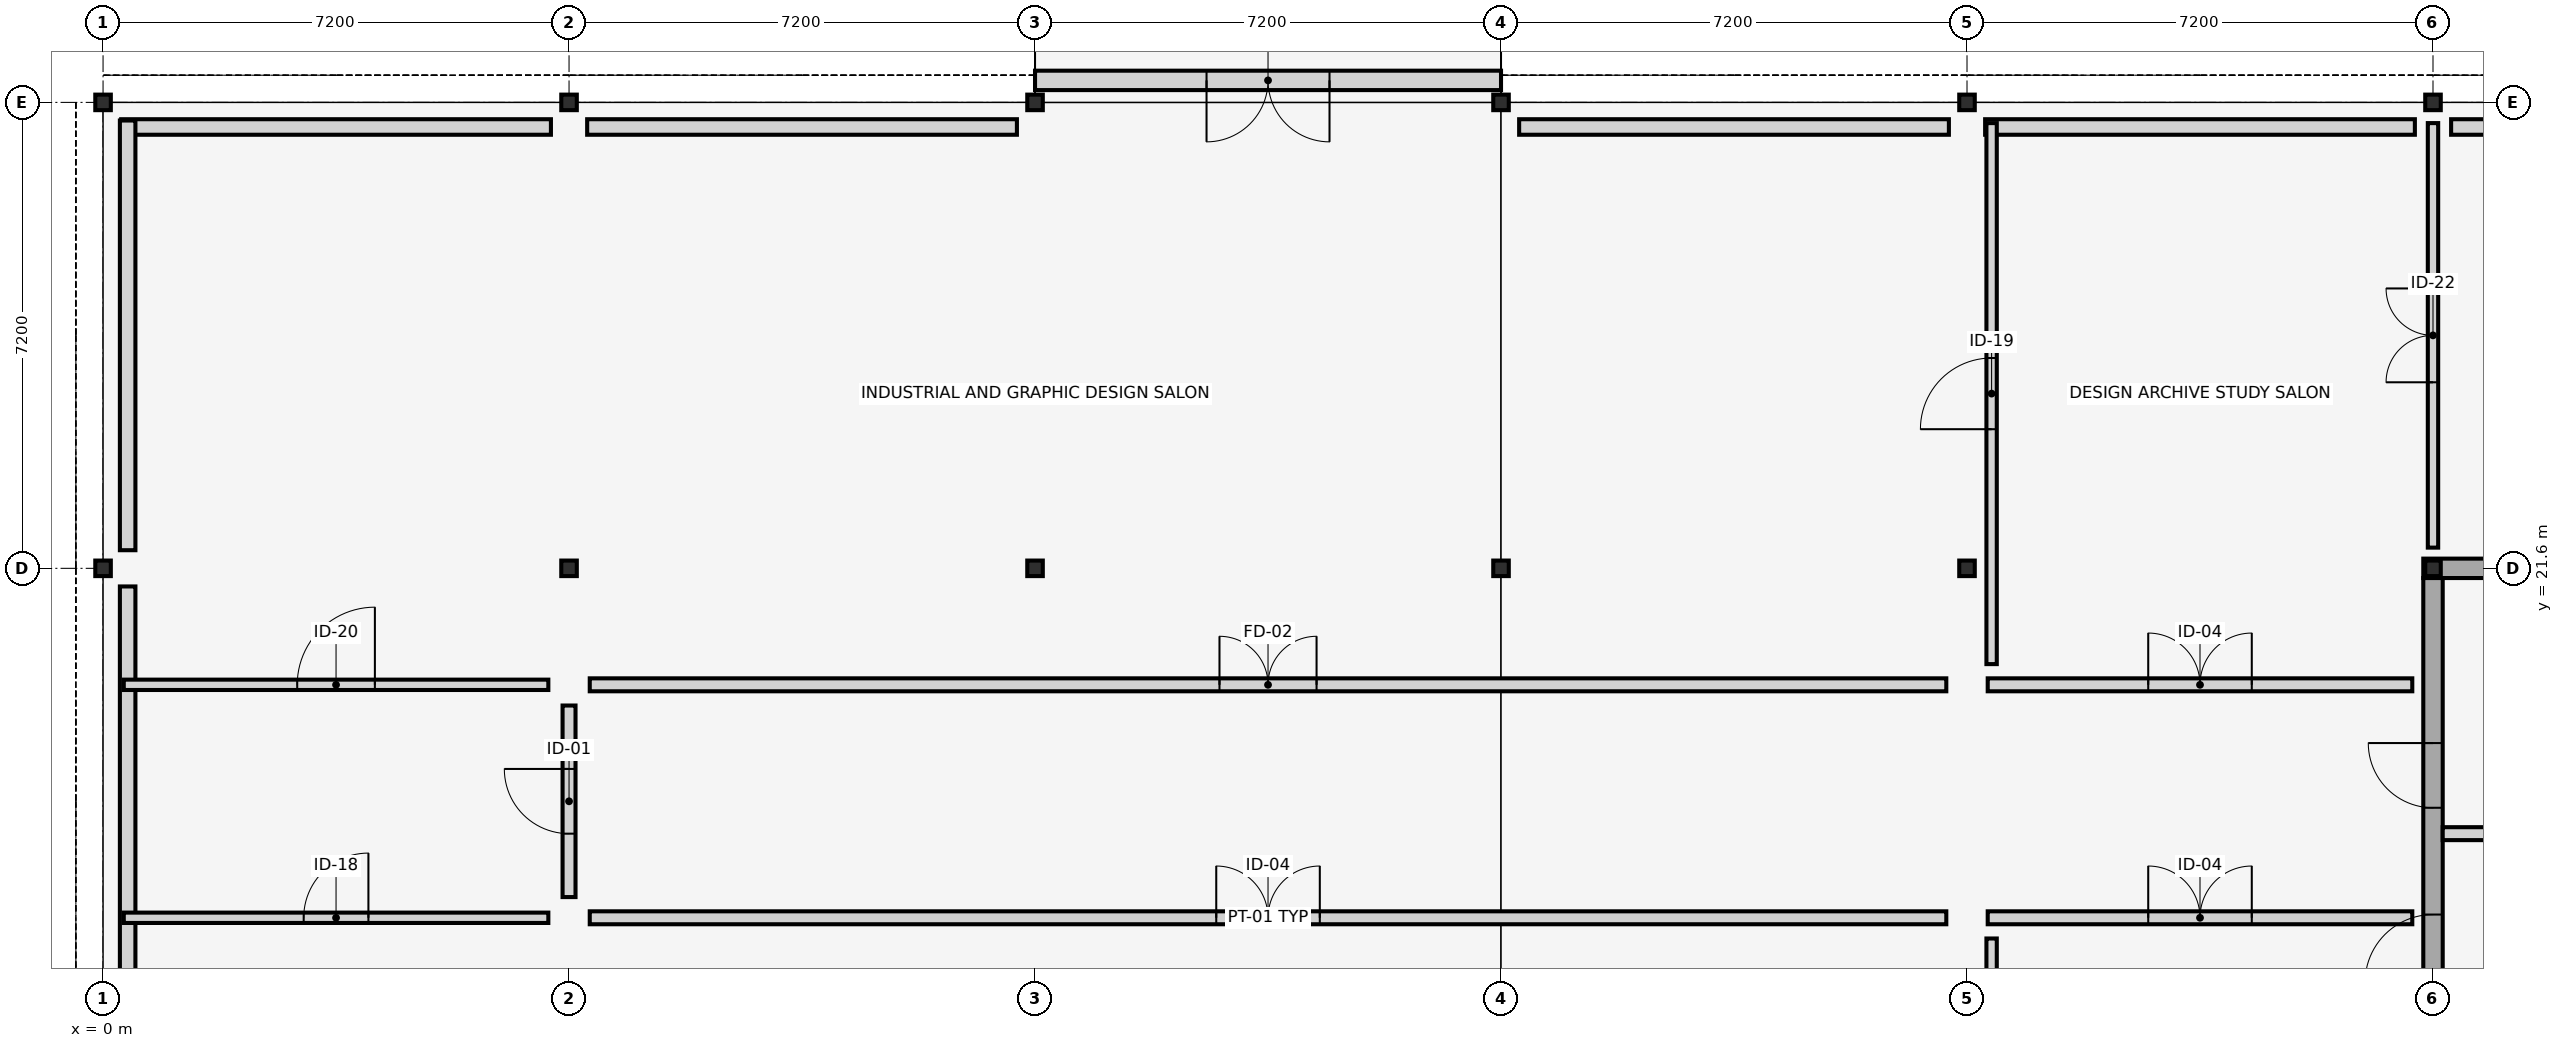
"""IFC4 building model, lengths in metres.
Left out: names, types, materials, properties, quantities, classifications, styles, units other than length and angle.
Written with IfcOpenShell. Run it as: python <this file> out.ifc"""

import sys

from ifc_helpers import new_model, si_unit, direction, frame, frame_2d, origin, origin_2d, place, context, subcontext, project, spatial, rectangle, i_section, extrude, element, fill, save


model = new_model("IFC4")
c1 = context("Model", 3, precision=1e-05, world=origin(), true_north=direction((0.0, 1.0)))
c2 = subcontext(c1, "Body", "Model", "MODEL_VIEW")
j1 = project(units=[si_unit("LENGTHUNIT", "METRE"), si_unit("PLANEANGLEUNIT", "RADIAN")], contexts=[c1])
p1 = place(None, origin())
s1 = spatial("IfcSite", under=j1, at=p1, CompositionType="ELEMENT")
p2 = place(p1, origin())
s2 = spatial("IfcBuilding", under=s1, at=p2, CompositionType="ELEMENT")
p3 = place(p2, frame((0.0, 0.0, 8.7)))
s3 = spatial("IfcBuildingStorey", under=s2, at=p3, CompositionType="ELEMENT", Elevation=8.7)
for number, where, z_axis, x_axis in (
    (1, (0.0, 21.6, 0.0), (0.0, 0.0, 1.0), (0.0, 1.0, 0.0)),
    (2, (0.0, 28.8, 0.0), (0.0, 0.0, 1.0), (1.0, 0.0, 0.0)),
    (3, (7.2, 21.6, 0.0), (0.0, 0.0, 1.0), (1.0, 0.0, 0.0)),
    (4, (7.2, 28.8, 0.0), (0.0, 0.0, 1.0), (0.0, 1.0, 0.0)),
    (5, (14.4, 21.6, 0.0), (0.0, 0.0, 1.0), (0.0, 1.0, 0.0)),
    (6, (14.4, 28.8, 0.0), (0.0, 0.0, 1.0), (1.0, 0.0, 0.0)),
    (7, (21.6, 21.6, 0.0), (0.0, 0.0, 1.0), (1.0, 0.0, 0.0)),
    (8, (21.6, 28.8, 0.0), (0.0, 0.0, 1.0), (0.0, 1.0, 0.0)),
    (9, (28.8, 21.6, 0.0), (0.0, 0.0, 1.0), (0.0, 1.0, 0.0)),
    (10, (28.8, 28.8, 0.0), (0.0, 0.0, 1.0), (1.0, 0.0, 0.0)),
    (11, (36.0, 21.6, 0.0), (0.0, 0.0, 1.0), (1.0, 0.0, 0.0)),
    (12, (36.0, 28.8, 0.0), (0.0, 0.0, 1.0), (0.0, 1.0, 0.0)),
):
    element("IfcColumn", number, at=place(p3, frame(where, z_axis=z_axis, x_axis=x_axis)), inside=s3, PredefinedType="COLUMN", context=c2, shape_type="SweptSolid", body=[
        extrude(i_section(OverallWidth=0.24, OverallDepth=0.24, WebThickness=0.01, FlangeThickness=0.017, FilletRadius=0.021, at=origin_2d()), origin(), (0.0, 0.0, 1.0), 4.2),
    ])
for number, where, z_axis, x_axis in (
    (13, (42.92, 28.42, 0.0), (0.0, 0.0, 1.0), (-1.0, 0.0, 0.0)),
    (14, (35.72, 28.42, 0.0), (0.0, 0.0, 1.0), (-1.0, 0.0, 0.0)),
):
    element("IfcWall", number, at=place(p3, frame(where, z_axis=z_axis, x_axis=x_axis)), inside=s3, PredefinedType="STANDARD", context=c2, shape_type="SweptSolid", body=[
        extrude(rectangle(XDim=6.64, YDim=0.24, at=frame_2d((3.32, 0.0))), origin(), (0.0, 0.0, 1.0), 3.58),
    ])
p4 = place(p3, frame((28.52, 28.42, 0.0), z_axis=(0.0, 0.0, 1.0), x_axis=(-1.0, 0.0, 0.0)))
e15 = element("IfcWall", 15, at=p4, inside=s3, PredefinedType="STANDARD", context=c2, shape_type="SweptSolid", body=[
    extrude(rectangle(XDim=6.64, YDim=0.24, at=frame_2d((3.32, 0.0))), origin(), (0.0, 0.0, 1.0), 3.58),
])
p5 = place(p3, frame((21.6, 29.14, 0.0), z_axis=(0.0, 0.0, 1.0), x_axis=(-1.0, 0.0, 0.0)))
e16 = element("IfcWall", 16, at=p5, inside=s3, PredefinedType="STANDARD", context=c2, shape_type="SweptSolid", body=[
    extrude(rectangle(XDim=7.2, YDim=0.3, at=frame_2d((3.6, 0.0))), origin(), (0.0, 0.0, 1.0), 3.65),
])
p6 = place(p5, frame((2.65, 0.0, 0.0)))
e17 = element("IfcOpeningElement", 17, at=p6, cuts=e16, PredefinedType="OPENING", context=c2, shape_type="SweptSolid", body=[
    extrude(rectangle(XDim=1.9, YDim=2.45, at=frame_2d((0.95, 1.225))), frame((0.0, 0.16, 0.0), z_axis=(0.0, -1.0, 0.0), x_axis=(1.0, 0.0, 0.0)), (0.0, 0.0, 1.0), 0.32),
])
p7 = place(p3, frame((14.12, 28.42, 0.0), z_axis=(0.0, 0.0, 1.0), x_axis=(-1.0, 0.0, 0.0)))
e18 = element("IfcWall", 18, at=p7, inside=s3, PredefinedType="STANDARD", context=c2, shape_type="SweptSolid", body=[
    extrude(rectangle(XDim=6.64, YDim=0.24, at=frame_2d((3.32, 0.0))), origin(), (0.0, 0.0, 1.0), 3.58),
])
p8 = place(p3, frame((6.92, 28.42, 0.0), z_axis=(0.0, 0.0, 1.0), x_axis=(-1.0, 0.0, 0.0)))
e19 = element("IfcWall", 19, at=p8, inside=s3, PredefinedType="STANDARD", context=c2, shape_type="SweptSolid", body=[
    extrude(rectangle(XDim=6.64, YDim=0.24, at=frame_2d((3.32, 0.0))), origin(), (0.0, 0.0, 1.0), 3.58),
])
for number, where, z_axis, x_axis in (
    (20, (0.38, 28.52, 0.0), (0.0, 0.0, 1.0), (0.0, -1.0, 0.0)),
    (21, (0.38, 21.32, 0.0), (0.0, 0.0, 1.0), (0.0, -1.0, 0.0)),
):
    element("IfcWall", number, at=place(p3, frame(where, z_axis=z_axis, x_axis=x_axis)), inside=s3, PredefinedType="STANDARD", context=c2, shape_type="SweptSolid", body=[
        extrude(rectangle(XDim=6.64, YDim=0.24, at=frame_2d((3.32, 0.0))), origin(), (0.0, 0.0, 1.0), 3.58),
    ])
p9 = place(p3, frame((35.85, 21.6, 0.0), z_axis=(0.0, 0.0, 1.0), x_axis=(1.0, 0.0, 0.0)))
e22 = element("IfcWall", 22, at=p9, inside=s3, PredefinedType="SHEAR", context=c2, shape_type="SweptSolid", body=[
    extrude(rectangle(XDim=7.35, YDim=0.3, at=frame_2d((3.675, 0.0))), origin(), (0.0, 0.0, 1.0), 3.96),
])
p10 = place(p3, frame((36.0, 7.35, 0.0), z_axis=(0.0, 0.0, 1.0), x_axis=(0.0, 1.0, 0.0)))
e23 = element("IfcWall", 23, at=p10, inside=s3, PredefinedType="SHEAR", context=c2, shape_type="SweptSolid", body=[
    extrude(rectangle(XDim=14.1, YDim=0.3, at=frame_2d((7.05, 0.0))), origin(), (0.0, 0.0, 1.0), 3.96),
])
p11 = place(p10, frame((3.55, 0.0, 0.0)))
e24 = element("IfcOpeningElement", 24, at=p11, cuts=e23, PredefinedType="OPENING", context=c2, shape_type="SweptSolid", body=[
    extrude(rectangle(XDim=1.3, YDim=2.2, at=frame_2d((0.65, 1.1))), frame((0.0, 0.16, 0.0), z_axis=(0.0, -1.0, 0.0), x_axis=(1.0, 0.0, 0.0)), (0.0, 0.0, 1.0), 0.32),
])
p12 = place(p10, frame((7.85, 0.0, 0.0)))
e25 = element("IfcOpeningElement", 25, at=p12, cuts=e23, PredefinedType="OPENING", context=c2, shape_type="SweptSolid", body=[
    extrude(rectangle(XDim=1.05, YDim=2.15, at=frame_2d((0.525, 1.075))), frame((0.0, 0.16, 0.0), z_axis=(0.0, -1.0, 0.0), x_axis=(1.0, 0.0, 0.0)), (0.0, 0.0, 1.0), 0.32),
])
p13 = place(p10, frame((10.55, 0.0, 0.0)))
e26 = element("IfcOpeningElement", 26, at=p13, cuts=e23, PredefinedType="OPENING", context=c2, shape_type="SweptSolid", body=[
    extrude(rectangle(XDim=1.0, YDim=2.15, at=frame_2d((0.5, 1.075))), frame((0.0, 0.16, 0.0), z_axis=(0.0, -1.0, 0.0), x_axis=(1.0, 0.0, 0.0)), (0.0, 0.0, 1.0), 0.32),
])
p14 = place(p3, frame((36.15, 17.5, 0.0), z_axis=(0.0, 0.0, 1.0), x_axis=(1.0, 0.0, 0.0)))
e27 = element("IfcWall", 27, at=p14, inside=s3, PredefinedType="PLUMBINGWALL", context=c2, shape_type="SweptSolid", body=[
    extrude(rectangle(XDim=3.55, YDim=0.2, at=frame_2d((1.775, 0.0))), origin(), (0.0, 0.0, 1.0), 3.38),
])
p15 = place(p3, frame((7.52, 16.2, 0.0), z_axis=(0.0, 0.0, 1.0), x_axis=(1.0, 0.0, 0.0)))
e28 = element("IfcWall", 28, at=p15, inside=s3, PredefinedType="PARTITIONING", context=c2, shape_type="SweptSolid", body=[
    extrude(rectangle(XDim=20.96, YDim=0.2, at=frame_2d((10.48, 0.0))), origin(), (0.0, 0.0, 1.0), 3.15),
])
p16 = place(p15, frame((9.68, 0.0, 0.0)))
e29 = element("IfcOpeningElement", 29, at=p16, cuts=e28, PredefinedType="OPENING", context=c2, shape_type="SweptSolid", body=[
    extrude(rectangle(XDim=1.6, YDim=2.35, at=frame_2d((0.8, 1.175))), frame((0.0, 0.11, 0.0), z_axis=(0.0, -1.0, 0.0), x_axis=(1.0, 0.0, 0.0)), (0.0, 0.0, 1.0), 0.22),
])
p17 = place(p3, frame((7.52, 19.8, 0.0), z_axis=(0.0, 0.0, 1.0), x_axis=(1.0, 0.0, 0.0)))
e30 = element("IfcWall", 30, at=p17, inside=s3, PredefinedType="PARTITIONING", context=c2, shape_type="SweptSolid", body=[
    extrude(rectangle(XDim=20.96, YDim=0.2, at=frame_2d((10.48, 0.0))), origin(), (0.0, 0.0, 1.0), 3.15),
])
p18 = place(p17, frame((9.73, 0.0, 0.0)))
e31 = element("IfcOpeningElement", 31, at=p18, cuts=e30, PredefinedType="OPENING", context=c2, shape_type="SweptSolid", body=[
    extrude(rectangle(XDim=1.5, YDim=2.25, at=frame_2d((0.75, 1.125))), frame((0.0, 0.11, 0.0), z_axis=(0.0, -1.0, 0.0), x_axis=(1.0, 0.0, 0.0)), (0.0, 0.0, 1.0), 0.22),
])
p19 = place(p3, frame((29.12, 16.2, 0.0), z_axis=(0.0, 0.0, 1.0), x_axis=(1.0, 0.0, 0.0)))
e32 = element("IfcWall", 32, at=p19, inside=s3, PredefinedType="PARTITIONING", context=c2, shape_type="SweptSolid", body=[
    extrude(rectangle(XDim=6.56, YDim=0.2, at=frame_2d((3.28, 0.0))), origin(), (0.0, 0.0, 1.0), 3.15),
])
p20 = place(p19, frame((2.48, 0.0, 0.0)))
e33 = element("IfcOpeningElement", 33, at=p20, cuts=e32, PredefinedType="OPENING", context=c2, shape_type="SweptSolid", body=[
    extrude(rectangle(XDim=1.6, YDim=2.35, at=frame_2d((0.8, 1.175))), frame((0.0, 0.11, 0.0), z_axis=(0.0, -1.0, 0.0), x_axis=(1.0, 0.0, 0.0)), (0.0, 0.0, 1.0), 0.22),
])
p21 = place(p3, frame((29.12, 19.8, 0.0), z_axis=(0.0, 0.0, 1.0), x_axis=(1.0, 0.0, 0.0)))
e34 = element("IfcWall", 34, at=p21, inside=s3, PredefinedType="PARTITIONING", context=c2, shape_type="SweptSolid", body=[
    extrude(rectangle(XDim=6.56, YDim=0.2, at=frame_2d((3.28, 0.0))), origin(), (0.0, 0.0, 1.0), 3.15),
])
p22 = place(p21, frame((2.48, 0.0, 0.0)))
e35 = element("IfcOpeningElement", 35, at=p22, cuts=e34, PredefinedType="OPENING", context=c2, shape_type="SweptSolid", body=[
    extrude(rectangle(XDim=1.6, YDim=2.35, at=frame_2d((0.8, 1.175))), frame((0.0, 0.11, 0.0), z_axis=(0.0, -1.0, 0.0), x_axis=(1.0, 0.0, 0.0)), (0.0, 0.0, 1.0), 0.22),
])
p23 = place(p3, frame((7.2, 16.52, 0.0), z_axis=(0.0, 0.0, 1.0), x_axis=(0.0, 1.0, 0.0)))
e36 = element("IfcWall", 36, at=p23, inside=s3, PredefinedType="PARTITIONING", context=c2, shape_type="SweptSolid", body=[
    extrude(rectangle(XDim=2.96, YDim=0.2, at=frame_2d((1.48, 0.0))), origin(), (0.0, 0.0, 1.0), 3.15),
])
p24 = place(p23, frame((0.98, 0.0, 0.0)))
e37 = element("IfcOpeningElement", 37, at=p24, cuts=e36, PredefinedType="OPENING", context=c2, shape_type="SweptSolid", body=[
    extrude(rectangle(XDim=1.0, YDim=2.15, at=frame_2d((0.5, 1.075))), frame((0.0, 0.11, 0.0), z_axis=(0.0, -1.0, 0.0), x_axis=(1.0, 0.0, 0.0)), (0.0, 0.0, 1.0), 0.22),
])
p25 = place(p3, frame((29.18, 0.32, 0.0), z_axis=(0.0, 0.0, 1.0), x_axis=(0.0, 1.0, 0.0)))
e38 = element("IfcWall", 38, at=p25, inside=s3, PredefinedType="PARTITIONING", context=c2, shape_type="SweptSolid", body=[
    extrude(rectangle(XDim=15.56, YDim=0.16, at=frame_2d((7.78, 0.0))), origin(), (0.0, 0.0, 1.0), 3.15),
])
p26 = place(p25, frame((2.143, 0.0, 0.0)))
e39 = element("IfcOpeningElement", 39, at=p26, cuts=e38, PredefinedType="OPENING", context=c2, shape_type="SweptSolid", body=[
    extrude(rectangle(XDim=0.9, YDim=2.1, at=frame_2d((0.45, 1.05))), frame((0.0, 0.09, 0.0), z_axis=(0.0, -1.0, 0.0), x_axis=(1.0, 0.0, 0.0)), (0.0, 0.0, 1.0), 0.18),
])
p27 = place(p3, frame((0.32, 16.2, 0.0), z_axis=(0.0, 0.0, 1.0), x_axis=(1.0, 0.0, 0.0)))
e40 = element("IfcWall", 40, at=p27, inside=s3, PredefinedType="PARTITIONING", context=c2, shape_type="SweptSolid", body=[
    extrude(rectangle(XDim=6.56, YDim=0.16, at=frame_2d((3.28, 0.0))), origin(), (0.0, 0.0, 1.0), 3.15),
])
p28 = place(p27, frame((2.78, 0.0, 0.0)))
e41 = element("IfcOpeningElement", 41, at=p28, cuts=e40, PredefinedType="OPENING", context=c2, shape_type="SweptSolid", body=[
    extrude(rectangle(XDim=1.0, YDim=2.25, at=frame_2d((0.5, 1.125))), frame((0.0, 0.09, 0.0), z_axis=(0.0, -1.0, 0.0), x_axis=(1.0, 0.0, 0.0)), (0.0, 0.0, 1.0), 0.18),
])
p29 = place(p3, frame((29.18, 20.12, 0.0), z_axis=(0.0, 0.0, 1.0), x_axis=(0.0, 1.0, 0.0)))
e42 = element("IfcWall", 42, at=p29, inside=s3, PredefinedType="PARTITIONING", context=c2, shape_type="SweptSolid", body=[
    extrude(rectangle(XDim=8.36, YDim=0.16, at=frame_2d((4.18, 0.0))), origin(), (0.0, 0.0, 1.0), 3.15),
])
p30 = place(p29, frame((3.63, 0.0, 0.0)))
e43 = element("IfcOpeningElement", 43, at=p30, cuts=e42, PredefinedType="OPENING", context=c2, shape_type="SweptSolid", body=[
    extrude(rectangle(XDim=1.1, YDim=2.35, at=frame_2d((0.55, 1.175))), frame((0.0, 0.09, 0.0), z_axis=(0.0, -1.0, 0.0), x_axis=(1.0, 0.0, 0.0)), (0.0, 0.0, 1.0), 0.18),
])
p31 = place(p3, frame((0.32, 19.8, 0.0), z_axis=(0.0, 0.0, 1.0), x_axis=(1.0, 0.0, 0.0)))
e44 = element("IfcWall", 44, at=p31, inside=s3, PredefinedType="PARTITIONING", context=c2, shape_type="SweptSolid", body=[
    extrude(rectangle(XDim=6.56, YDim=0.16, at=frame_2d((3.28, 0.0))), origin(), (0.0, 0.0, 1.0), 3.15),
])
p32 = place(p31, frame((2.68, 0.0, 0.0)))
e45 = element("IfcOpeningElement", 45, at=p32, cuts=e44, PredefinedType="OPENING", context=c2, shape_type="SweptSolid", body=[
    extrude(rectangle(XDim=1.2, YDim=2.4, at=frame_2d((0.6, 1.2))), frame((0.0, 0.09, 0.0), z_axis=(0.0, -1.0, 0.0), x_axis=(1.0, 0.0, 0.0)), (0.0, 0.0, 1.0), 0.18),
])
p33 = place(p3, frame((36.0, 21.92, 0.0), z_axis=(0.0, 0.0, 1.0), x_axis=(0.0, 1.0, 0.0)))
e46 = element("IfcWall", 46, at=p33, inside=s3, PredefinedType="PARTITIONING", context=c2, shape_type="SweptSolid", body=[
    extrude(rectangle(XDim=6.56, YDim=0.16, at=frame_2d((3.28, 0.0))), origin(), (0.0, 0.0, 1.0), 3.15),
])
p34 = place(p33, frame((2.555, 0.0, 0.0)))
e47 = element("IfcOpeningElement", 47, at=p34, cuts=e46, PredefinedType="OPENING", context=c2, shape_type="SweptSolid", body=[
    extrude(rectangle(XDim=1.45, YDim=2.35, at=frame_2d((0.725, 1.175))), frame((0.0, 0.09, 0.0), z_axis=(0.0, -1.0, 0.0), x_axis=(1.0, 0.0, 0.0)), (0.0, 0.0, 1.0), 0.18),
])
p35 = place(p6, origin())
e48 = element("IfcDoor", 48, at=p35, inside=s3, OperationType="DOUBLE_DOOR_SINGLE_SWING", PredefinedType="DOOR", context=c2, shape_type="SweptSolid", body=[
    extrude(rectangle(XDim=1.9, YDim=2.45, at=frame_2d((0.95, 1.225))), frame((0.0, 0.025, 0.0), z_axis=(0.0, -1.0, 0.0), x_axis=(1.0, 0.0, 0.0)), (0.0, 0.0, 1.0), 0.05),
])
fill(e17, e48)
p36 = place(p12, origin())
e49 = element("IfcDoor", 49, at=p36, inside=s3, OperationType="SINGLE_SWING_LEFT", PredefinedType="DOOR", context=c2, shape_type="SweptSolid", body=[
    extrude(rectangle(XDim=1.05, YDim=2.15, at=frame_2d((0.525, 1.075))), frame((0.0, 0.025, 0.0), z_axis=(0.0, -1.0, 0.0), x_axis=(1.0, 0.0, 0.0)), (0.0, 0.0, 1.0), 0.05),
])
fill(e25, e49)
p37 = place(p13, origin())
e50 = element("IfcDoor", 50, at=p37, inside=s3, OperationType="SINGLE_SWING_RIGHT", PredefinedType="DOOR", context=c2, shape_type="SweptSolid", body=[
    extrude(rectangle(XDim=1.0, YDim=2.15, at=frame_2d((0.5, 1.075))), frame((0.0, 0.025, 0.0), z_axis=(0.0, -1.0, 0.0), x_axis=(1.0, 0.0, 0.0)), (0.0, 0.0, 1.0), 0.05),
])
fill(e26, e50)
p38 = place(p16, origin())
e51 = element("IfcDoor", 51, at=p38, inside=s3, OperationType="DOUBLE_DOOR_SINGLE_SWING", PredefinedType="DOOR", context=c2, shape_type="SweptSolid", body=[
    extrude(rectangle(XDim=1.6, YDim=2.35, at=frame_2d((0.8, 1.175))), frame((0.0, 0.025, 0.0), z_axis=(0.0, -1.0, 0.0), x_axis=(1.0, 0.0, 0.0)), (0.0, 0.0, 1.0), 0.05),
])
fill(e29, e51)
p39 = place(p18, origin())
e52 = element("IfcDoor", 52, at=p39, inside=s3, OperationType="DOUBLE_DOOR_SINGLE_SWING", PredefinedType="DOOR", context=c2, shape_type="SweptSolid", body=[
    extrude(rectangle(XDim=1.5, YDim=2.25, at=frame_2d((0.75, 1.125))), frame((0.0, 0.025, 0.0), z_axis=(0.0, -1.0, 0.0), x_axis=(1.0, 0.0, 0.0)), (0.0, 0.0, 1.0), 0.05),
])
fill(e31, e52)
p40 = place(p20, origin())
e53 = element("IfcDoor", 53, at=p40, inside=s3, OperationType="DOUBLE_DOOR_SINGLE_SWING", PredefinedType="DOOR", context=c2, shape_type="SweptSolid", body=[
    extrude(rectangle(XDim=1.6, YDim=2.35, at=frame_2d((0.8, 1.175))), frame((0.0, 0.025, 0.0), z_axis=(0.0, -1.0, 0.0), x_axis=(1.0, 0.0, 0.0)), (0.0, 0.0, 1.0), 0.05),
])
fill(e33, e53)
p41 = place(p22, origin())
e54 = element("IfcDoor", 54, at=p41, inside=s3, OperationType="DOUBLE_DOOR_SINGLE_SWING", PredefinedType="DOOR", context=c2, shape_type="SweptSolid", body=[
    extrude(rectangle(XDim=1.6, YDim=2.35, at=frame_2d((0.8, 1.175))), frame((0.0, 0.025, 0.0), z_axis=(0.0, -1.0, 0.0), x_axis=(1.0, 0.0, 0.0)), (0.0, 0.0, 1.0), 0.05),
])
fill(e35, e54)
p42 = place(p24, origin())
e55 = element("IfcDoor", 55, at=p42, inside=s3, OperationType="SINGLE_SWING_RIGHT", PredefinedType="DOOR", context=c2, shape_type="SweptSolid", body=[
    extrude(rectangle(XDim=1.0, YDim=2.15, at=frame_2d((0.5, 1.075))), frame((0.0, 0.025, 0.0), z_axis=(0.0, -1.0, 0.0), x_axis=(1.0, 0.0, 0.0)), (0.0, 0.0, 1.0), 0.05),
])
fill(e37, e55)
p43 = place(p28, origin())
e56 = element("IfcDoor", 56, at=p43, inside=s3, OperationType="SINGLE_SWING_RIGHT", PredefinedType="DOOR", context=c2, shape_type="SweptSolid", body=[
    extrude(rectangle(XDim=1.0, YDim=2.25, at=frame_2d((0.5, 1.125))), frame((0.0, 0.025, 0.0), z_axis=(0.0, -1.0, 0.0), x_axis=(1.0, 0.0, 0.0)), (0.0, 0.0, 1.0), 0.05),
])
fill(e41, e56)
p44 = place(p30, origin())
e57 = element("IfcDoor", 57, at=p44, inside=s3, OperationType="SINGLE_SWING_LEFT", PredefinedType="DOOR", context=c2, shape_type="SweptSolid", body=[
    extrude(rectangle(XDim=1.1, YDim=2.35, at=frame_2d((0.55, 1.175))), frame((0.0, 0.025, 0.0), z_axis=(0.0, -1.0, 0.0), x_axis=(1.0, 0.0, 0.0)), (0.0, 0.0, 1.0), 0.05),
])
fill(e43, e57)
p45 = place(p32, origin())
e58 = element("IfcDoor", 58, at=p45, inside=s3, OperationType="SINGLE_SWING_RIGHT", PredefinedType="DOOR", context=c2, shape_type="SweptSolid", body=[
    extrude(rectangle(XDim=1.2, YDim=2.4, at=frame_2d((0.6, 1.2))), frame((0.0, 0.025, 0.0), z_axis=(0.0, -1.0, 0.0), x_axis=(1.0, 0.0, 0.0)), (0.0, 0.0, 1.0), 0.05),
])
fill(e45, e58)
p46 = place(p34, origin())
e59 = element("IfcDoor", 59, at=p46, inside=s3, OperationType="DOUBLE_DOOR_SINGLE_SWING", PredefinedType="DOOR", context=c2, shape_type="SweptSolid", body=[
    extrude(rectangle(XDim=1.45, YDim=2.35, at=frame_2d((0.725, 1.175))), frame((0.0, 0.025, 0.0), z_axis=(0.0, -1.0, 0.0), x_axis=(1.0, 0.0, 0.0)), (0.0, 0.0, 1.0), 0.05),
])
fill(e47, e59)
save(model, sys.argv[1])
